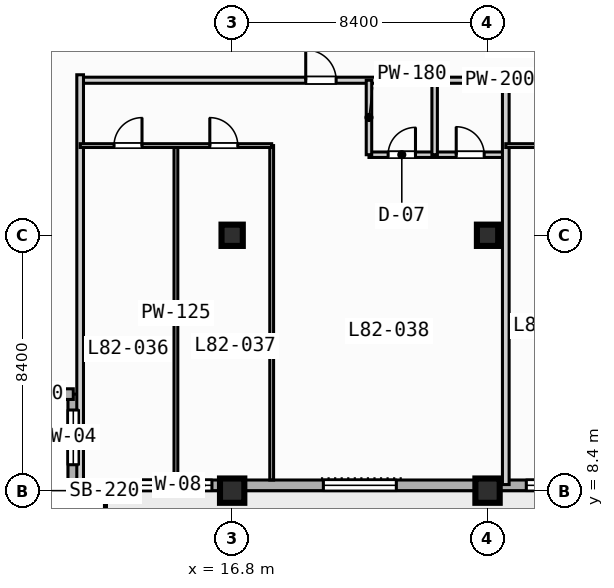
"""IFC4 building model, lengths in metres.
Left out: names, types, materials, properties, quantities, classifications, styles, units other than length and angle.
Written with IfcOpenShell. Run it as: python <this file> out.ifc"""

import sys

from ifc_helpers import new_model, si_unit, direction, frame, frame_2d, origin, origin_2d, place, context, subcontext, project, spatial, rectangle, extrude, element, fill, save


model = new_model("IFC4")
c1 = context("Model", 3, precision=1e-05, world=origin(), true_north=direction((0.0, 1.0)))
c2 = subcontext(c1, "Body", "Model", "MODEL_VIEW")
j1 = project(units=[si_unit("LENGTHUNIT", "METRE"), si_unit("PLANEANGLEUNIT", "RADIAN")], contexts=[c1])
p1 = place(None, origin())
s1 = spatial("IfcSite", under=j1, at=p1, CompositionType="ELEMENT")
p2 = place(p1, origin())
s2 = spatial("IfcBuilding", under=s1, at=p2, CompositionType="ELEMENT")
p3 = place(p2, frame((0.0, 0.0, 332.0)))
s3 = spatial("IfcBuildingStorey", under=s2, at=p3, CompositionType="ELEMENT", Elevation=332.0)
p4 = place(p3, frame((16.8, 8.4, 0.0), z_axis=(0.0, 0.0, 1.0), x_axis=(1.0, 0.0, 0.0)))
e1 = element("IfcColumn", 1, at=p4, inside=s3, PredefinedType="COLUMN", context=c2, shape_type="SweptSolid", body=[
    extrude(rectangle(XDim=0.8, YDim=0.8, at=origin_2d()), origin(), (0.0, 0.0, 1.0), 3.9),
])
p5 = place(p3, frame((16.8, 16.8, 0.0), z_axis=(0.0, 0.0, 1.0), x_axis=(1.0, 0.0, 0.0)))
e2 = element("IfcColumn", 2, at=p5, inside=s3, PredefinedType="COLUMN", context=c2, shape_type="SweptSolid", body=[
    extrude(rectangle(XDim=0.7, YDim=0.7, at=origin_2d()), origin(), (0.0, 0.0, 1.0), 3.9),
])
p6 = place(p3, frame((25.2, 8.4, 0.0), z_axis=(0.0, 0.0, 1.0), x_axis=(1.0, 0.0, 0.0)))
e3 = element("IfcColumn", 3, at=p6, inside=s3, PredefinedType="COLUMN", context=c2, shape_type="SweptSolid", body=[
    extrude(rectangle(XDim=0.8, YDim=0.8, at=origin_2d()), origin(), (0.0, 0.0, 1.0), 3.9),
])
p7 = place(p3, frame((25.2, 16.8, 0.0), z_axis=(0.0, 0.0, 1.0), x_axis=(1.0, 0.0, 0.0)))
e4 = element("IfcColumn", 4, at=p7, inside=s3, PredefinedType="COLUMN", context=c2, shape_type="SweptSolid", body=[
    extrude(rectangle(XDim=0.7, YDim=0.7, at=origin_2d()), origin(), (0.0, 0.0, 1.0), 3.9),
])
p8 = place(p3, frame((11.575, 8.575, 0.0), z_axis=(0.0, 0.0, 1.0), x_axis=(0.0, 1.0, 0.0)))
e5 = element("IfcWall", 5, at=p8, inside=s3, PredefinedType="STANDARD", context=c2, shape_type="SweptSolid", body=[
    extrude(rectangle(XDim=3.0, YDim=0.35, at=frame_2d((1.5, 0.0))), origin(), (0.0, 0.0, 1.0), 3.67),
])
p9 = place(p8, frame((0.677, 0.0, 0.85)))
e6 = element("IfcOpeningElement", 6, at=p9, cuts=e5, PredefinedType="OPENING", context=c2, shape_type="SweptSolid", body=[
    extrude(rectangle(XDim=1.8, YDim=1.8, at=frame_2d((0.9, 0.9))), frame((0.0, 0.185, 0.0), z_axis=(0.0, -1.0, 0.0), x_axis=(1.0, 0.0, 0.0)), (0.0, 0.0, 1.0), 0.37),
])
p10 = place(p3, frame((11.575, 11.575, 0.0), z_axis=(0.0, 0.0, 1.0), x_axis=(-1.0, 0.0, 0.0)))
e7 = element("IfcWall", 7, at=p10, inside=s3, PredefinedType="STANDARD", context=c2, shape_type="SweptSolid", body=[
    extrude(rectangle(XDim=3.0, YDim=0.35, at=frame_2d((1.5, 0.0))), origin(), (0.0, 0.0, 1.0), 3.67),
])
p11 = place(p3, frame((64.025, 8.575, 0.0), z_axis=(0.0, 0.0, 1.0), x_axis=(-1.0, 0.0, 0.0)))
e8 = element("IfcWall", 8, at=p11, inside=s3, PredefinedType="STANDARD", context=c2, shape_type="SweptSolid", body=[
    extrude(rectangle(XDim=52.45, YDim=0.35, at=frame_2d((26.225, 0.0))), origin(), (0.0, 0.0, 1.0), 3.67),
])
p12 = place(p11, frame((32.925, 0.0, 0.0)))
e9 = element("IfcOpeningElement", 9, at=p12, cuts=e8, PredefinedType="OPENING", context=c2, shape_type="SweptSolid", body=[
    extrude(rectangle(XDim=1.4, YDim=2.2, at=frame_2d((0.7, 1.1))), frame((0.0, 0.185, 0.0), z_axis=(0.0, -1.0, 0.0), x_axis=(1.0, 0.0, 0.0)), (0.0, 0.0, 1.0), 0.37),
])
p13 = place(p11, frame((41.825, 0.0, 0.85)))
e10 = element("IfcOpeningElement", 10, at=p13, cuts=e8, PredefinedType="OPENING", context=c2, shape_type="SweptSolid", body=[
    extrude(rectangle(XDim=2.4, YDim=1.95, at=frame_2d((1.2, 0.975))), frame((0.0, 0.185, 0.0), z_axis=(0.0, -1.0, 0.0), x_axis=(1.0, 0.0, 0.0)), (0.0, 0.0, 1.0), 0.37),
])
p14 = place(p11, frame((25.025, 0.0, 0.85)))
e11 = element("IfcOpeningElement", 11, at=p14, cuts=e8, PredefinedType="OPENING", context=c2, shape_type="SweptSolid", body=[
    extrude(rectangle(XDim=2.4, YDim=1.95, at=frame_2d((1.2, 0.975))), frame((0.0, 0.185, 0.0), z_axis=(0.0, -1.0, 0.0), x_axis=(1.0, 0.0, 0.0)), (0.0, 0.0, 1.0), 0.37),
])
p15 = place(p11, frame((16.925, 0.0, 0.85)))
e12 = element("IfcOpeningElement", 12, at=p15, cuts=e8, PredefinedType="OPENING", context=c2, shape_type="SweptSolid", body=[
    extrude(rectangle(XDim=1.8, YDim=1.8, at=frame_2d((0.9, 0.9))), frame((0.0, 0.185, 0.0), z_axis=(0.0, -1.0, 0.0), x_axis=(1.0, 0.0, 0.0)), (0.0, 0.0, 1.0), 0.37),
])
p16 = place(p11, frame((49.75, 0.0, 0.85)))
e13 = element("IfcOpeningElement", 13, at=p16, cuts=e8, PredefinedType="OPENING", context=c2, shape_type="SweptSolid", body=[
    extrude(rectangle(XDim=1.8, YDim=1.8, at=frame_2d((0.9, 0.9))), frame((0.0, 0.185, 0.0), z_axis=(0.0, -1.0, 0.0), x_axis=(1.0, 0.0, 0.0)), (0.0, 0.0, 1.0), 0.37),
])
p17 = place(p11, frame((47.89, 0.0, 0.85)))
e14 = element("IfcOpeningElement", 14, at=p17, cuts=e8, PredefinedType="OPENING", context=c2, shape_type="SweptSolid", body=[
    extrude(rectangle(XDim=0.72, YDim=1.8, at=frame_2d((0.36, 0.9))), frame((0.0, 0.185, 0.0), z_axis=(0.0, -1.0, 0.0), x_axis=(1.0, 0.0, 0.0)), (0.0, 0.0, 1.0), 0.37),
])
p18 = place(p11, frame((35.75, 0.0, 0.85)))
e15 = element("IfcOpeningElement", 15, at=p18, cuts=e8, PredefinedType="OPENING", context=c2, shape_type="SweptSolid", body=[
    extrude(rectangle(XDim=1.8, YDim=1.8, at=frame_2d((0.9, 0.9))), frame((0.0, 0.185, 0.0), z_axis=(0.0, -1.0, 0.0), x_axis=(1.0, 0.0, 0.0)), (0.0, 0.0, 1.0), 0.37),
])
p19 = place(p3, frame((11.8, 21.9, 0.0), z_axis=(0.0, 0.0, 1.0), x_axis=(1.0, 0.0, 0.0)))
e16 = element("IfcWall", 16, at=p19, inside=s3, PredefinedType="PARTITIONING", context=c2, shape_type="SweptSolid", body=[
    extrude(rectangle(XDim=27.6, YDim=0.2, at=frame_2d((13.8, 0.0))), origin(), (0.0, 0.0, 1.0), 3.67),
])
p20 = place(p19, frame((7.42, 0.0, 0.0)))
e17 = element("IfcOpeningElement", 17, at=p20, cuts=e16, PredefinedType="OPENING", context=c2, shape_type="SweptSolid", body=[
    extrude(rectangle(XDim=1.0, YDim=2.15, at=frame_2d((0.5, 1.075))), frame((0.0, 0.11, 0.0), z_axis=(0.0, -1.0, 0.0), x_axis=(1.0, 0.0, 0.0)), (0.0, 0.0, 1.0), 0.22),
])
p21 = place(p19, frame((21.22, 0.0, 0.0)))
e18 = element("IfcOpeningElement", 18, at=p21, cuts=e16, PredefinedType="OPENING", context=c2, shape_type="SweptSolid", body=[
    extrude(rectangle(XDim=1.0, YDim=2.15, at=frame_2d((0.5, 1.075))), frame((0.0, 0.11, 0.0), z_axis=(0.0, -1.0, 0.0), x_axis=(1.0, 0.0, 0.0)), (0.0, 0.0, 1.0), 0.22),
])
p22 = place(p3, frame((11.8, 8.6, 0.0), z_axis=(0.0, 0.0, 1.0), x_axis=(0.0, 1.0, 0.0)))
e19 = element("IfcWall", 19, at=p22, inside=s3, PredefinedType="PARTITIONING", context=c2, shape_type="SweptSolid", body=[
    extrude(rectangle(XDim=13.48, YDim=0.22, at=frame_2d((6.74, 0.0))), origin(), (0.0, 0.0, 1.0), 3.67),
])
p23 = place(p3, frame((21.3, 19.45, 0.0), z_axis=(0.0, 0.0, 1.0), x_axis=(1.0, 0.0, 0.0)))
e20 = element("IfcWall", 20, at=p23, inside=s3, PredefinedType="PLUMBINGWALL", context=c2, shape_type="SweptSolid", body=[
    extrude(rectangle(XDim=4.5, YDim=0.18, at=frame_2d((2.25, 0.0))), origin(), (0.0, 0.0, 1.0), 3.67),
])
p24 = place(p23, frame((0.63, 0.0, 0.0)))
e21 = element("IfcOpeningElement", 21, at=p24, cuts=e20, PredefinedType="OPENING", context=c2, shape_type="SweptSolid", body=[
    extrude(rectangle(XDim=0.9, YDim=2.1, at=frame_2d((0.45, 1.05))), frame((0.0, 0.1, 0.0), z_axis=(0.0, -1.0, 0.0), x_axis=(1.0, 0.0, 0.0)), (0.0, 0.0, 1.0), 0.2),
])
p25 = place(p23, frame((2.87, 0.0, 0.0)))
e22 = element("IfcOpeningElement", 22, at=p25, cuts=e20, PredefinedType="OPENING", context=c2, shape_type="SweptSolid", body=[
    extrude(rectangle(XDim=0.92, YDim=2.1, at=frame_2d((0.46, 1.05))), frame((0.0, 0.1, 0.0), z_axis=(0.0, -1.0, 0.0), x_axis=(1.0, 0.0, 0.0)), (0.0, 0.0, 1.0), 0.2),
])
for number, where, z_axis, x_axis in (
    (23, (21.3, 19.45, 0.0), (0.0, 0.0, 1.0), (0.0, 1.0, 0.0)),
    (24, (23.46, 19.45, 0.0), (0.0, 0.0, 1.0), (0.0, 1.0, 0.0)),
):
    element("IfcWall", number, at=place(p3, frame(where, z_axis=z_axis, x_axis=x_axis)), inside=s3, PredefinedType="PLUMBINGWALL", context=c2, shape_type="SweptSolid", body=[
        extrude(rectangle(XDim=2.45, YDim=0.18, at=frame_2d((1.225, 0.0))), origin(), (0.0, 0.0, 1.0), 3.67),
    ])
for number, where, z_axis, x_axis in (
    (25, (14.95, 8.75, 0.0), (0.0, 0.0, 1.0), (0.0, 1.0, 0.0)),
    (26, (18.1, 8.75, 0.0), (0.0, 0.0, 1.0), (0.0, 1.0, 0.0)),
):
    element("IfcWall", number, at=place(p3, frame(where, z_axis=z_axis, x_axis=x_axis)), inside=s3, PredefinedType="PARTITIONING", context=c2, shape_type="SweptSolid", body=[
        extrude(rectangle(XDim=11.0, YDim=0.125, at=frame_2d((5.5, 0.0))), origin(), (0.0, 0.0, 1.0), 3.67),
    ])
p26 = place(p3, frame((11.8, 19.75, 0.0), z_axis=(0.0, 0.0, 1.0), x_axis=(1.0, 0.0, 0.0)))
e27 = element("IfcWall", 27, at=p26, inside=s3, PredefinedType="PARTITIONING", context=c2, shape_type="SweptSolid", body=[
    extrude(rectangle(XDim=6.3, YDim=0.125, at=frame_2d((3.15, 0.0))), origin(), (0.0, 0.0, 1.0), 3.67),
])
p27 = place(p26, frame((1.115, 0.0, 0.0)))
e28 = element("IfcOpeningElement", 28, at=p27, cuts=e27, PredefinedType="OPENING", context=c2, shape_type="SweptSolid", body=[
    extrude(rectangle(XDim=0.92, YDim=2.1, at=frame_2d((0.46, 1.05))), frame((0.0, 0.073, 0.0), z_axis=(0.0, -1.0, 0.0), x_axis=(1.0, 0.0, 0.0)), (0.0, 0.0, 1.0), 0.145),
])
p28 = place(p26, frame((4.265, 0.0, 0.0)))
e29 = element("IfcOpeningElement", 29, at=p28, cuts=e27, PredefinedType="OPENING", context=c2, shape_type="SweptSolid", body=[
    extrude(rectangle(XDim=0.92, YDim=2.1, at=frame_2d((0.46, 1.05))), frame((0.0, 0.073, 0.0), z_axis=(0.0, -1.0, 0.0), x_axis=(1.0, 0.0, 0.0)), (0.0, 0.0, 1.0), 0.145),
])
p29 = place(p3, frame((25.8, 8.6, 0.0), z_axis=(0.0, 0.0, 1.0), x_axis=(0.0, 1.0, 0.0)))
e30 = element("IfcWall", 30, at=p29, inside=s3, PredefinedType="PARTITIONING", context=c2, shape_type="SweptSolid", body=[
    extrude(rectangle(XDim=13.48, YDim=0.22, at=frame_2d((6.74, 0.0))), origin(), (0.0, 0.0, 1.0), 3.67),
])
p30 = place(p3, frame((25.8, 19.75, 0.0), z_axis=(0.0, 0.0, 1.0), x_axis=(1.0, 0.0, 0.0)))
e31 = element("IfcWall", 31, at=p30, inside=s3, PredefinedType="PARTITIONING", context=c2, shape_type="SweptSolid", body=[
    extrude(rectangle(XDim=6.3, YDim=0.125, at=frame_2d((3.15, 0.0))), origin(), (0.0, 0.0, 1.0), 3.67),
])
p31 = place(p30, frame((1.115, 0.0, 0.0)))
e32 = element("IfcOpeningElement", 32, at=p31, cuts=e31, PredefinedType="OPENING", context=c2, shape_type="SweptSolid", body=[
    extrude(rectangle(XDim=0.92, YDim=2.1, at=frame_2d((0.46, 1.05))), frame((0.0, 0.073, 0.0), z_axis=(0.0, -1.0, 0.0), x_axis=(1.0, 0.0, 0.0)), (0.0, 0.0, 1.0), 0.145),
])
p32 = place(p30, frame((4.265, 0.0, 0.0)))
e33 = element("IfcOpeningElement", 33, at=p32, cuts=e31, PredefinedType="OPENING", context=c2, shape_type="SweptSolid", body=[
    extrude(rectangle(XDim=0.92, YDim=2.1, at=frame_2d((0.46, 1.05))), frame((0.0, 0.073, 0.0), z_axis=(0.0, -1.0, 0.0), x_axis=(1.0, 0.0, 0.0)), (0.0, 0.0, 1.0), 0.145),
])
p33 = place(p9, origin())
e34 = element("IfcWindow", 34, at=p33, inside=s3, PartitioningType="SINGLE_PANEL", PredefinedType="WINDOW", context=c2, shape_type="SweptSolid", body=[
    extrude(rectangle(XDim=1.8, YDim=1.8, at=frame_2d((0.9, 0.9))), frame((0.0, 0.03, 0.0), z_axis=(0.0, -1.0, 0.0), x_axis=(1.0, 0.0, 0.0)), (0.0, 0.0, 1.0), 0.06),
])
fill(e6, e34)
p34 = place(p13, origin())
e35 = element("IfcWindow", 35, at=p34, inside=s3, PartitioningType="SINGLE_PANEL", PredefinedType="WINDOW", context=c2, shape_type="SweptSolid", body=[
    extrude(rectangle(XDim=2.4, YDim=1.95, at=frame_2d((1.2, 0.975))), frame((0.0, 0.03, 0.0), z_axis=(0.0, -1.0, 0.0), x_axis=(1.0, 0.0, 0.0)), (0.0, 0.0, 1.0), 0.06),
])
fill(e10, e35)
p35 = place(p16, origin())
e36 = element("IfcWindow", 36, at=p35, inside=s3, PartitioningType="SINGLE_PANEL", PredefinedType="WINDOW", context=c2, shape_type="SweptSolid", body=[
    extrude(rectangle(XDim=1.8, YDim=1.8, at=frame_2d((0.9, 0.9))), frame((0.0, 0.03, 0.0), z_axis=(0.0, -1.0, 0.0), x_axis=(1.0, 0.0, 0.0)), (0.0, 0.0, 1.0), 0.06),
])
fill(e13, e36)
p36 = place(p17, origin())
e37 = element("IfcWindow", 37, at=p36, inside=s3, PartitioningType="SINGLE_PANEL", PredefinedType="WINDOW", context=c2, shape_type="SweptSolid", body=[
    extrude(rectangle(XDim=0.72, YDim=1.8, at=frame_2d((0.36, 0.9))), frame((0.0, 0.03, 0.0), z_axis=(0.0, -1.0, 0.0), x_axis=(1.0, 0.0, 0.0)), (0.0, 0.0, 1.0), 0.06),
])
fill(e14, e37)
p37 = place(p18, origin())
e38 = element("IfcWindow", 38, at=p37, inside=s3, PartitioningType="SINGLE_PANEL", PredefinedType="WINDOW", context=c2, shape_type="SweptSolid", body=[
    extrude(rectangle(XDim=1.8, YDim=1.8, at=frame_2d((0.9, 0.9))), frame((0.0, 0.03, 0.0), z_axis=(0.0, -1.0, 0.0), x_axis=(1.0, 0.0, 0.0)), (0.0, 0.0, 1.0), 0.06),
])
fill(e15, e38)
p38 = place(p20, origin())
e39 = element("IfcDoor", 39, at=p38, inside=s3, OperationType="SINGLE_SWING_LEFT", PredefinedType="DOOR", context=c2, shape_type="SweptSolid", body=[
    extrude(rectangle(XDim=1.0, YDim=2.15, at=frame_2d((0.5, 1.075))), frame((0.0, 0.025, 0.0), z_axis=(0.0, -1.0, 0.0), x_axis=(1.0, 0.0, 0.0)), (0.0, 0.0, 1.0), 0.05),
])
fill(e17, e39)
p39 = place(p24, origin())
e40 = element("IfcDoor", 40, at=p39, inside=s3, OperationType="SINGLE_SWING_RIGHT", PredefinedType="DOOR", context=c2, shape_type="SweptSolid", body=[
    extrude(rectangle(XDim=0.9, YDim=2.1, at=frame_2d((0.45, 1.05))), frame((0.0, 0.025, 0.0), z_axis=(0.0, -1.0, 0.0), x_axis=(1.0, 0.0, 0.0)), (0.0, 0.0, 1.0), 0.05),
])
fill(e21, e40)
p40 = place(p25, origin())
e41 = element("IfcDoor", 41, at=p40, inside=s3, OperationType="SINGLE_SWING_LEFT", PredefinedType="DOOR", context=c2, shape_type="SweptSolid", body=[
    extrude(rectangle(XDim=0.92, YDim=2.1, at=frame_2d((0.46, 1.05))), frame((0.0, 0.025, 0.0), z_axis=(0.0, -1.0, 0.0), x_axis=(1.0, 0.0, 0.0)), (0.0, 0.0, 1.0), 0.05),
])
fill(e22, e41)
p41 = place(p27, origin())
e42 = element("IfcDoor", 42, at=p41, inside=s3, OperationType="SINGLE_SWING_RIGHT", PredefinedType="DOOR", context=c2, shape_type="SweptSolid", body=[
    extrude(rectangle(XDim=0.92, YDim=2.1, at=frame_2d((0.46, 1.05))), frame((0.0, 0.025, 0.0), z_axis=(0.0, -1.0, 0.0), x_axis=(1.0, 0.0, 0.0)), (0.0, 0.0, 1.0), 0.05),
])
fill(e28, e42)
p42 = place(p28, origin())
e43 = element("IfcDoor", 43, at=p42, inside=s3, OperationType="SINGLE_SWING_LEFT", PredefinedType="DOOR", context=c2, shape_type="SweptSolid", body=[
    extrude(rectangle(XDim=0.92, YDim=2.1, at=frame_2d((0.46, 1.05))), frame((0.0, 0.025, 0.0), z_axis=(0.0, -1.0, 0.0), x_axis=(1.0, 0.0, 0.0)), (0.0, 0.0, 1.0), 0.05),
])
fill(e29, e43)
save(model, sys.argv[1])
